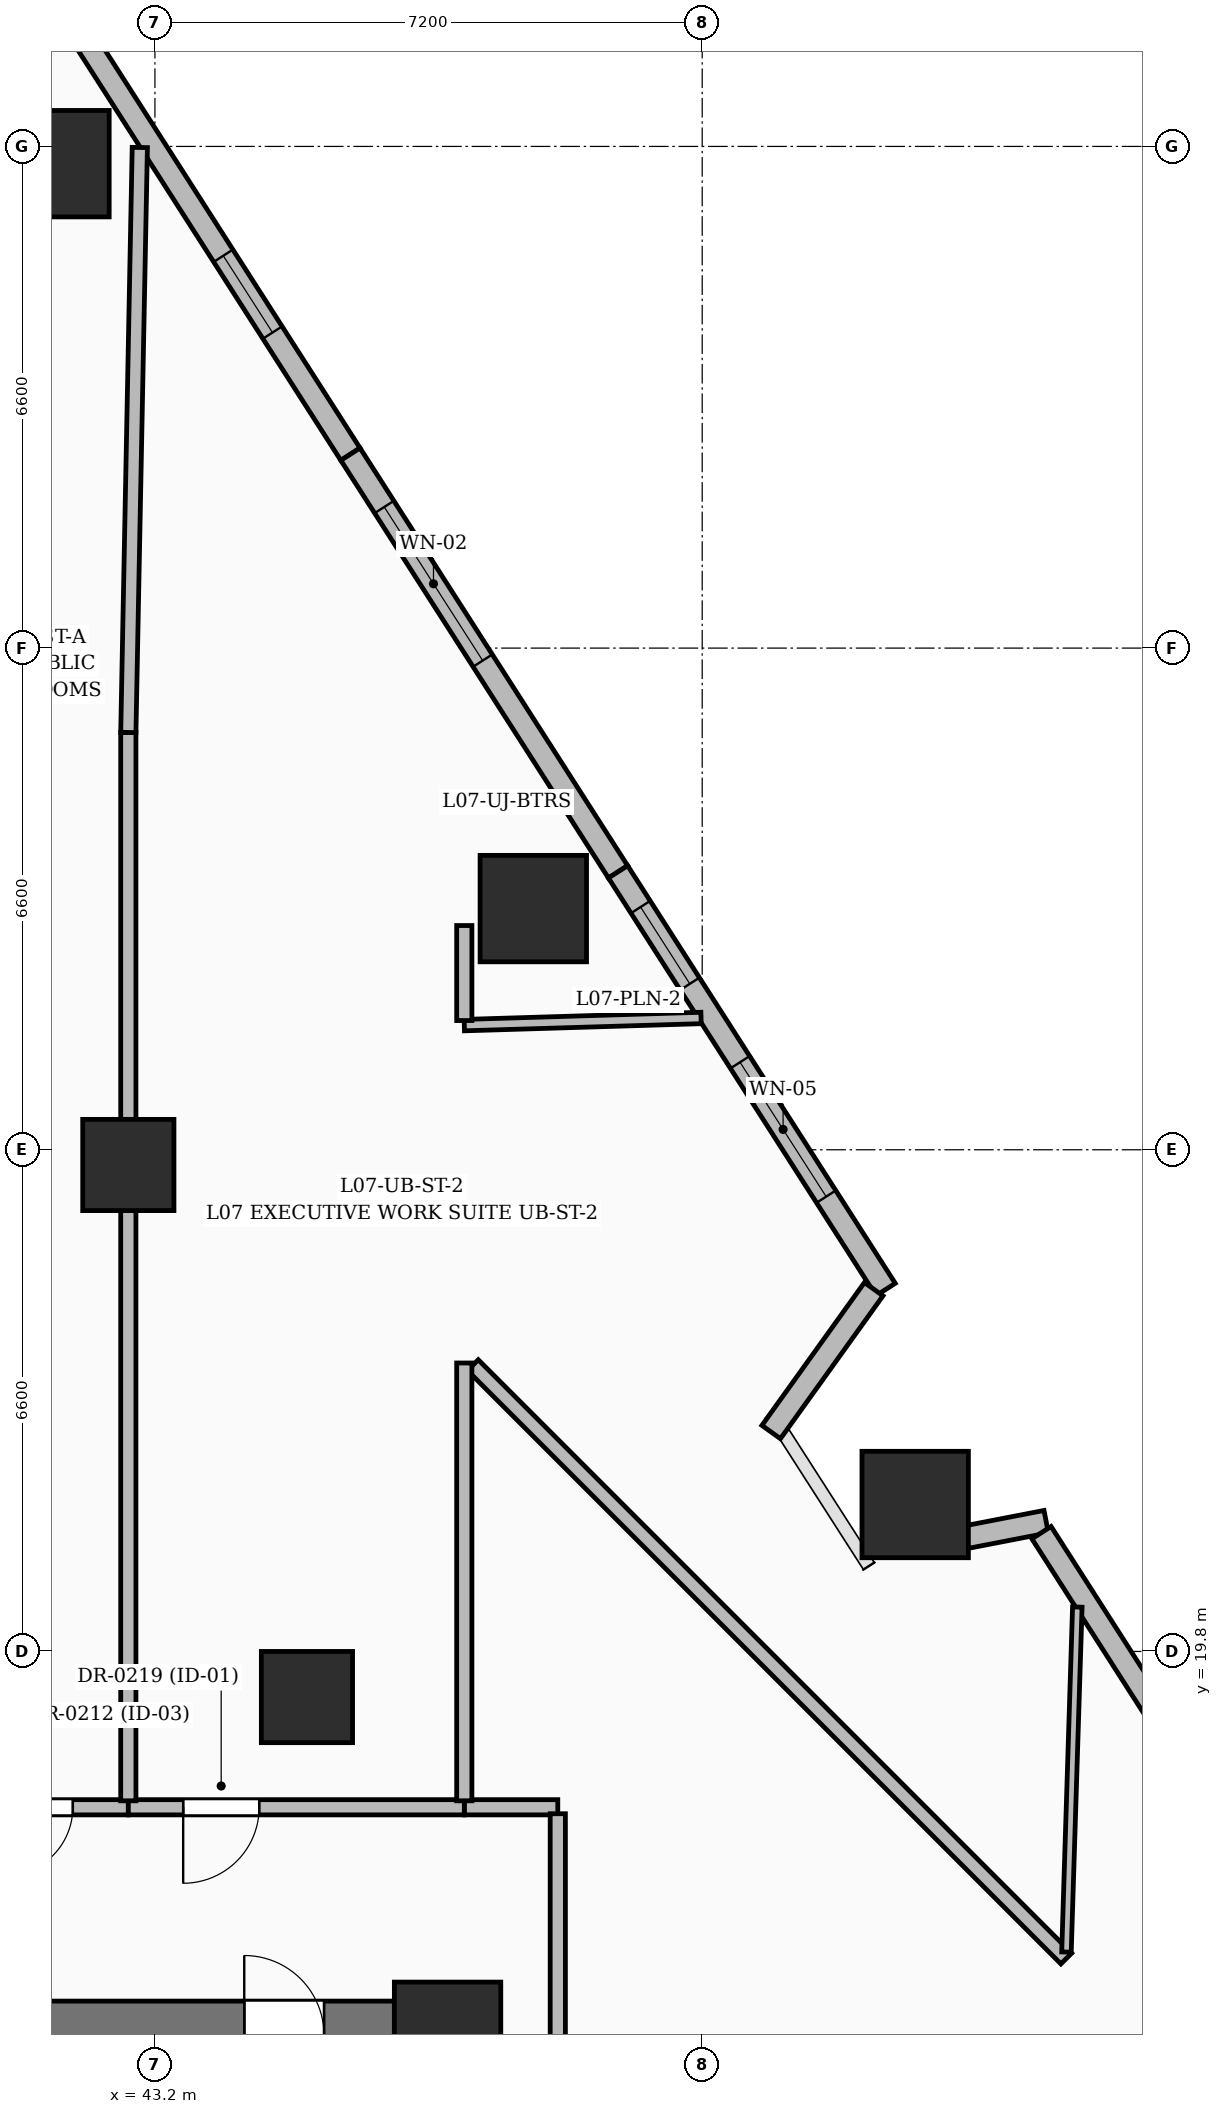
"""IFC4 building model, lengths in metres.
Left out: names, types, materials, properties, quantities, classifications, styles, units other than length and angle.
Written with IfcOpenShell. Run it as: python <this file> out.ifc"""

import sys

from ifc_helpers import new_model, si_unit, direction, frame, frame_2d, origin, origin_2d, place, context, subcontext, project, spatial, rectangle, extrude, element, fill, save


model = new_model("IFC4")
c1 = context("Model", 3, precision=1e-05, world=origin(), true_north=direction((0.0, 1.0)))
c2 = subcontext(c1, "Body", "Model", "MODEL_VIEW")
j1 = project(units=[si_unit("LENGTHUNIT", "METRE"), si_unit("PLANEANGLEUNIT", "RADIAN")], contexts=[c1])
p1 = place(None, origin())
s1 = spatial("IfcSite", under=j1, at=p1, CompositionType="ELEMENT")
p2 = place(p1, origin())
s2 = spatial("IfcBuilding", under=s1, at=p2, CompositionType="ELEMENT")
p3 = place(p2, frame((0.0, 0.0, 35.4)))
s3 = spatial("IfcBuildingStorey", under=s2, at=p3, CompositionType="ELEMENT", Elevation=35.4)
p4 = place(p3, frame((47.05, 14.75, 0.0), z_axis=(0.0, 0.0, 1.0), x_axis=(1.0, 0.0, 0.0)))
e1 = element("IfcColumn", 1, at=p4, inside=s3, PredefinedType="COLUMN", context=c2, shape_type="SweptSolid", body=[
    extrude(rectangle(XDim=1.4, YDim=1.4, at=origin_2d()), origin(), (0.0, 0.0, 1.0), 3.6),
])
for number, where, z_axis, x_axis in (
    (2, (45.2, 19.2, 0.0), (0.0, 0.0, 1.0), (1.0, 0.0, 0.0)),
    (3, (42.85, 26.2, 0.0), (0.0, 0.0, 1.0), (1.0, 0.0, 0.0)),
):
    element("IfcColumn", number, at=place(p3, frame(where, z_axis=z_axis, x_axis=x_axis)), inside=s3, PredefinedType="COLUMN", context=c2, shape_type="SweptSolid", body=[
        extrude(rectangle(XDim=1.2, YDim=1.2, at=origin_2d()), origin(), (0.0, 0.0, 1.0), 3.6),
    ])
p5 = place(p3, frame((35.85, 14.75, 0.0), z_axis=(0.0, 0.0, 1.0), x_axis=(1.0, 0.0, 0.0)))
e4 = element("IfcWall", 4, at=p5, inside=s3, PredefinedType="SHEAR", context=c2, shape_type="SweptSolid", body=[
    extrude(rectangle(XDim=10.5, YDim=0.9, at=frame_2d((5.25, 0.0))), origin(), (0.0, 0.0, 1.0), 3.6),
])
p6 = place(p5, frame((0.925, 0.0, 0.0)))
e5 = element("IfcOpeningElement", 5, at=p6, cuts=e4, PredefinedType="OPENING", context=c2, shape_type="SweptSolid", body=[
    extrude(rectangle(XDim=1.05, YDim=2.15, at=frame_2d((0.525, 1.075))), frame((0.0, 0.46, 0.0), z_axis=(0.0, -1.0, 0.0), x_axis=(1.0, 0.0, 0.0)), (0.0, 0.0, 1.0), 0.92),
])
p7 = place(p5, frame((8.525, 0.0, 0.0)))
e6 = element("IfcOpeningElement", 6, at=p7, cuts=e4, PredefinedType="OPENING", context=c2, shape_type="SweptSolid", body=[
    extrude(rectangle(XDim=1.05, YDim=2.15, at=frame_2d((0.525, 1.075))), frame((0.0, 0.46, 0.0), z_axis=(0.0, -1.0, 0.0), x_axis=(1.0, 0.0, 0.0)), (0.0, 0.0, 1.0), 0.92),
])
for number, where, z_axis, x_axis in (
    (7, (53.202, 21.733, 0.0), (0.0, 0.0, 1.0), (1.0, 0.0, 0.0)),
    (8, (48.178, 29.573, 0.0), (0.0, 0.0, 1.0), (1.0, 0.0, 0.0)),
    (9, (41.898, 39.373, 0.0), (0.0, 0.0, 1.0), (1.0, 0.0, 0.0)),
):
    element("IfcColumn", number, at=place(p3, frame(where, z_axis=z_axis, x_axis=x_axis)), inside=s3, PredefinedType="COLUMN", context=c2, shape_type="SweptSolid", body=[
        extrude(rectangle(XDim=1.4, YDim=1.4, at=origin_2d()), origin(), (0.0, 0.0, 1.0), 3.6),
    ])
p8 = place(p3, frame((42.251, 41.045, 0.0), z_axis=(0.0, 0.0, 1.0), x_axis=(0.539526045631, -0.841968910403, 0.0)))
e10 = element("IfcWall", 10, at=p8, inside=s3, PredefinedType="SOLIDWALL", context=c2, shape_type="SweptSolid", body=[
    extrude(rectangle(XDim=6.526, YDim=0.3, at=frame_2d((3.263, 0.0))), origin(), (0.0, 0.0, 1.0), 3.35),
])
p9 = place(p8, frame((3.425, 0.0, 0.8)))
e11 = element("IfcOpeningElement", 11, at=p9, cuts=e10, PredefinedType="OPENING", context=c2, shape_type="SweptSolid", body=[
    extrude(rectangle(XDim=1.2, YDim=1.8, at=frame_2d((0.6, 0.9))), frame((0.0, 0.16, 0.0), z_axis=(0.0, -1.0, 0.0), x_axis=(1.0, 0.0, 0.0)), (0.0, 0.0, 1.0), 0.32),
])
p10 = place(p3, frame((45.772, 35.551, 0.0), z_axis=(0.0, 0.0, 1.0), x_axis=(0.539526045631, -0.841968910403, 0.0)))
e12 = element("IfcWall", 12, at=p10, inside=s3, PredefinedType="SOLIDWALL", context=c2, shape_type="SweptSolid", body=[
    extrude(rectangle(XDim=6.526, YDim=0.3, at=frame_2d((3.263, 0.0))), origin(), (0.0, 0.0, 1.0), 3.35),
])
p11 = place(p10, frame((0.825, 0.0, 0.6)))
e13 = element("IfcOpeningElement", 13, at=p11, cuts=e12, PredefinedType="OPENING", context=c2, shape_type="SweptSolid", body=[
    extrude(rectangle(XDim=2.4, YDim=2.1, at=frame_2d((1.2, 1.05))), frame((0.0, 0.16, 0.0), z_axis=(0.0, -1.0, 0.0), x_axis=(1.0, 0.0, 0.0)), (0.0, 0.0, 1.0), 0.32),
])
p12 = place(p3, frame((49.293, 30.057, 0.0), z_axis=(0.0, 0.0, 1.0), x_axis=(0.539509050887, -0.84197980024, 0.0)))
e14 = element("IfcWall", 14, at=p12, inside=s3, PredefinedType="SOLIDWALL", context=c2, shape_type="SweptSolid", body=[
    extrude(rectangle(XDim=6.526, YDim=0.3, at=frame_2d((3.263, 0.0))), origin(), (0.0, 0.0, 1.0), 3.35),
])
p13 = place(p12, frame((2.975, 0.0, 0.55)))
e15 = element("IfcOpeningElement", 15, at=p13, cuts=e14, PredefinedType="OPENING", context=c2, shape_type="SweptSolid", body=[
    extrude(rectangle(XDim=2.1, YDim=2.4, at=frame_2d((1.05, 1.2))), frame((0.0, 0.16, 0.0), z_axis=(0.0, -1.0, 0.0), x_axis=(1.0, 0.0, 0.0)), (0.0, 0.0, 1.0), 0.32),
])
p14 = place(p12, frame((0.55, 0.0, 0.8)))
e16 = element("IfcOpeningElement", 16, at=p14, cuts=e14, PredefinedType="OPENING", context=c2, shape_type="SweptSolid", body=[
    extrude(rectangle(XDim=1.2, YDim=1.8, at=frame_2d((0.6, 0.9))), frame((0.0, 0.16, 0.0), z_axis=(0.0, -1.0, 0.0), x_axis=(1.0, 0.0, 0.0)), (0.0, 0.0, 1.0), 0.32),
])
p15 = place(p3, frame((52.656, 24.566, 0.0), z_axis=(0.0, 0.0, 1.0), x_axis=(-0.583053244013, -0.812433944789, 0.0)))
e17 = element("IfcWall", 17, at=p15, inside=s3, PredefinedType="SOLIDWALL", context=c2, shape_type="SweptSolid", body=[
    extrude(rectangle(XDim=2.314, YDim=0.3, at=frame_2d((1.157, 0.0))), origin(), (0.0, 0.0, 1.0), 2.375),
])
p16 = place(p3, frame((53.864, 21.302, 0.0), z_axis=(0.0, 0.0, 1.0), x_axis=(0.981752657473, 0.190162350493, 0.0)))
e18 = element("IfcWall", 18, at=p16, inside=s3, PredefinedType="SOLIDWALL", context=c2, shape_type="SweptSolid", body=[
    extrude(rectangle(XDim=1.081, YDim=0.3, at=frame_2d((0.541, 0.0))), origin(), (0.0, 0.0, 1.0), 2.375),
])
p17 = place(p3, frame((54.864, 21.363, 0.0), z_axis=(0.0, 0.0, 1.0), x_axis=(0.539525561028, -0.841969220932, 0.0)))
e19 = element("IfcWall", 19, at=p17, inside=s3, PredefinedType="SOLIDWALL", context=c2, shape_type="SweptSolid", body=[
    extrude(rectangle(XDim=5.872, YDim=0.3, at=frame_2d((2.936, 0.0))), origin(), (0.0, 0.0, 1.0), 3.35),
])
p18 = place(p17, frame((2.745, 0.0, 0.6)))
e20 = element("IfcOpeningElement", 20, at=p18, cuts=e19, PredefinedType="OPENING", context=c2, shape_type="SweptSolid", body=[
    extrude(rectangle(XDim=1.5, YDim=2.1, at=frame_2d((0.75, 1.05))), frame((0.0, 0.16, 0.0), z_axis=(0.0, -1.0, 0.0), x_axis=(1.0, 0.0, 0.0)), (0.0, 0.0, 1.0), 0.32),
])
p19 = place(p3, frame((48.5, 17.75, 0.0), z_axis=(0.0, 0.0, 1.0), x_axis=(-1.0, 0.0, 0.0)))
e21 = element("IfcWall", 21, at=p19, inside=s3, PredefinedType="PARTITIONING", context=c2, shape_type="SweptSolid", body=[
    extrude(rectangle(XDim=1.23, YDim=0.2, at=frame_2d((0.615, 0.0))), origin(), (0.0, 0.0, 1.0), 2.712),
])
p20 = place(p3, frame((42.85, 17.75, 0.0), z_axis=(0.0, 0.0, 1.0), x_axis=(-1.0, 0.0, 0.0)))
e22 = element("IfcWall", 22, at=p20, inside=s3, PredefinedType="PARTITIONING", context=c2, shape_type="SweptSolid", body=[
    extrude(rectangle(XDim=2.36, YDim=0.2, at=frame_2d((1.18, 0.0))), origin(), (0.0, 0.0, 1.0), 3.35),
])
p21 = place(p20, frame((0.73, 0.0, 0.0)))
e23 = element("IfcOpeningElement", 23, at=p21, cuts=e22, PredefinedType="OPENING", context=c2, shape_type="SweptSolid", body=[
    extrude(rectangle(XDim=0.9, YDim=2.1, at=frame_2d((0.45, 1.05))), frame((0.0, 0.11, 0.0), z_axis=(0.0, -1.0, 0.0), x_axis=(1.0, 0.0, 0.0)), (0.0, 0.0, 1.0), 0.22),
])
p22 = place(p3, frame((47.27, 17.75, 0.0), z_axis=(0.0, 0.0, 1.0), x_axis=(-1.0, 0.0, 0.0)))
e24 = element("IfcWall", 24, at=p22, inside=s3, PredefinedType="PARTITIONING", context=c2, shape_type="SweptSolid", body=[
    extrude(rectangle(XDim=4.42, YDim=0.2, at=frame_2d((2.21, 0.0))), origin(), (0.0, 0.0, 1.0), 2.309),
])
p23 = place(p22, frame((2.698, 0.0, 0.0)))
e25 = element("IfcOpeningElement", 25, at=p23, cuts=e24, PredefinedType="OPENING", context=c2, shape_type="SweptSolid", body=[
    extrude(rectangle(XDim=1.0, YDim=2.2, at=frame_2d((0.5, 1.1))), frame((0.0, 0.11, 0.0), z_axis=(0.0, -1.0, 0.0), x_axis=(1.0, 0.0, 0.0)), (0.0, 0.0, 1.0), 0.22),
])
p24 = place(p3, frame((55.19, 15.76, 0.0), z_axis=(0.0, 0.0, 1.0), x_axis=(-0.707106781187, 0.707106781187, 0.0)))
e26 = element("IfcWall", 26, at=p24, inside=s3, PredefinedType="PARTITIONING", context=c2, shape_type="SweptSolid", body=[
    extrude(rectangle(XDim=11.041, YDim=0.2, at=frame_2d((5.52, 0.0))), origin(), (0.0, 0.0, 1.0), 2.228),
])
p25 = place(p3, frame((47.27, 23.595, 0.0), z_axis=(0.0, 0.0, 1.0), x_axis=(0.0, -1.0, 0.0)))
e27 = element("IfcWall", 27, at=p25, inside=s3, PredefinedType="PARTITIONING", context=c2, shape_type="SweptSolid", body=[
    extrude(rectangle(XDim=5.76, YDim=0.2, at=frame_2d((2.88, 0.0))), origin(), (0.0, 0.0, 1.0), 2.712),
])
p26 = place(p3, frame((55.192, 15.845, 0.0), z_axis=(0.0, 0.0, 1.0), x_axis=(0.031449581736, 0.99950533956, 0.0)))
e28 = element("IfcWall", 28, at=p26, inside=s3, PredefinedType="PARTITIONING", context=c2, shape_type="SweptSolid", body=[
    extrude(rectangle(XDim=4.541, YDim=0.125, at=frame_2d((2.271, 0.0))), origin(), (0.0, 0.0, 1.0), 2.37),
])
p27 = place(p3, frame((50.385, 28.134, 0.0), z_axis=(0.0, 0.0, 1.0), x_axis=(-0.999545052024, -0.030161050633, 0.0)))
e29 = element("IfcWall", 29, at=p27, inside=s3, PredefinedType="PARTITIONING", context=c2, shape_type="SweptSolid", body=[
    extrude(rectangle(XDim=3.116, YDim=0.15, at=frame_2d((1.558, 0.0))), origin(), (0.0, 0.0, 1.0), 2.228),
])
p28 = place(p3, frame((47.27, 29.35, 0.0), z_axis=(0.0, 0.0, 1.0), x_axis=(0.0, -1.0, 0.0)))
e30 = element("IfcWall", 30, at=p28, inside=s3, PredefinedType="PARTITIONING", context=c2, shape_type="SweptSolid", body=[
    extrude(rectangle(XDim=1.25, YDim=0.2, at=frame_2d((0.625, 0.0))), origin(), (0.0, 0.0, 1.0), 3.35),
])
p29 = place(p3, frame((42.85, 17.835, 0.0), z_axis=(0.0, 0.0, 1.0), x_axis=(0.0, 1.0, 0.0)))
e31 = element("IfcWall", 31, at=p29, inside=s3, PredefinedType="PARTITIONING", context=c2, shape_type="SweptSolid", body=[
    extrude(rectangle(XDim=14.055, YDim=0.2, at=frame_2d((7.027, 0.0))), origin(), (0.0, 0.0, 1.0), 2.228),
])
p30 = place(p3, frame((42.85, 31.89, 0.0), z_axis=(0.0, 0.0, 1.0), x_axis=(0.019600966642, 0.999807882599, 0.0)))
e32 = element("IfcWall", 32, at=p30, inside=s3, PredefinedType="PARTITIONING", context=c2, shape_type="SweptSolid", body=[
    extrude(rectangle(XDim=7.698, YDim=0.2, at=frame_2d((3.849, 0.0))), origin(), (0.0, 0.0, 1.0), 2.37),
])
p31 = place(p3, frame((48.5, 14.285, 0.0), z_axis=(0.0, 0.0, 1.0), x_axis=(0.0, 1.0, 0.0)))
e33 = element("IfcWall", 33, at=p31, inside=s3, PredefinedType="PARTITIONING", context=c2, shape_type="SweptSolid", body=[
    extrude(rectangle(XDim=3.38, YDim=0.2, at=frame_2d((1.69, 0.0))), origin(), (0.0, 0.0, 1.0), 2.228),
])
p32 = place(p9, origin())
e34 = element("IfcWindow", 34, at=p32, inside=s3, PartitioningType="SINGLE_PANEL", PredefinedType="WINDOW", context=c2, shape_type="SweptSolid", body=[
    extrude(rectangle(XDim=1.2, YDim=1.8, at=frame_2d((0.6, 0.9))), frame((0.0, 0.03, 0.0), z_axis=(0.0, -1.0, 0.0), x_axis=(1.0, 0.0, 0.0)), (0.0, 0.0, 1.0), 0.06),
])
fill(e11, e34)
p33 = place(p11, origin())
e35 = element("IfcWindow", 35, at=p33, inside=s3, PartitioningType="SINGLE_PANEL", PredefinedType="WINDOW", context=c2, shape_type="SweptSolid", body=[
    extrude(rectangle(XDim=2.4, YDim=2.1, at=frame_2d((1.2, 1.05))), frame((0.0, 0.03, 0.0), z_axis=(0.0, -1.0, 0.0), x_axis=(1.0, 0.0, 0.0)), (0.0, 0.0, 1.0), 0.06),
])
fill(e13, e35)
p34 = place(p13, origin())
e36 = element("IfcWindow", 36, at=p34, inside=s3, PartitioningType="SINGLE_PANEL", PredefinedType="WINDOW", context=c2, shape_type="SweptSolid", body=[
    extrude(rectangle(XDim=2.1, YDim=2.4, at=frame_2d((1.05, 1.2))), frame((0.0, 0.03, 0.0), z_axis=(0.0, -1.0, 0.0), x_axis=(1.0, 0.0, 0.0)), (0.0, 0.0, 1.0), 0.06),
])
fill(e15, e36)
p35 = place(p14, origin())
e37 = element("IfcWindow", 37, at=p35, inside=s3, PartitioningType="SINGLE_PANEL", PredefinedType="WINDOW", context=c2, shape_type="SweptSolid", body=[
    extrude(rectangle(XDim=1.2, YDim=1.8, at=frame_2d((0.6, 0.9))), frame((0.0, 0.03, 0.0), z_axis=(0.0, -1.0, 0.0), x_axis=(1.0, 0.0, 0.0)), (0.0, 0.0, 1.0), 0.06),
])
fill(e16, e37)
p36 = place(p7, origin())
e38 = element("IfcDoor", 38, at=p36, inside=s3, OperationType="SINGLE_SWING_LEFT", PredefinedType="DOOR", context=c2, shape_type="SweptSolid", body=[
    extrude(rectangle(XDim=1.05, YDim=2.15, at=frame_2d((0.525, 1.075))), frame((0.0, 0.025, 0.0), z_axis=(0.0, -1.0, 0.0), x_axis=(1.0, 0.0, 0.0)), (0.0, 0.0, 1.0), 0.05),
])
fill(e6, e38)
p37 = place(p21, origin())
e39 = element("IfcDoor", 39, at=p37, inside=s3, OperationType="SINGLE_SWING_RIGHT", PredefinedType="DOOR", context=c2, shape_type="SweptSolid", body=[
    extrude(rectangle(XDim=0.9, YDim=2.1, at=frame_2d((0.45, 1.05))), frame((0.0, 0.025, 0.0), z_axis=(0.0, -1.0, 0.0), x_axis=(1.0, 0.0, 0.0)), (0.0, 0.0, 1.0), 0.05),
])
fill(e23, e39)
p38 = place(p23, origin())
e40 = element("IfcDoor", 40, at=p38, inside=s3, OperationType="SINGLE_SWING_RIGHT", PredefinedType="DOOR", context=c2, shape_type="SweptSolid", body=[
    extrude(rectangle(XDim=1.0, YDim=2.2, at=frame_2d((0.5, 1.1))), frame((0.0, 0.025, 0.0), z_axis=(0.0, -1.0, 0.0), x_axis=(1.0, 0.0, 0.0)), (0.0, 0.0, 1.0), 0.05),
])
fill(e25, e40)
save(model, sys.argv[1])
